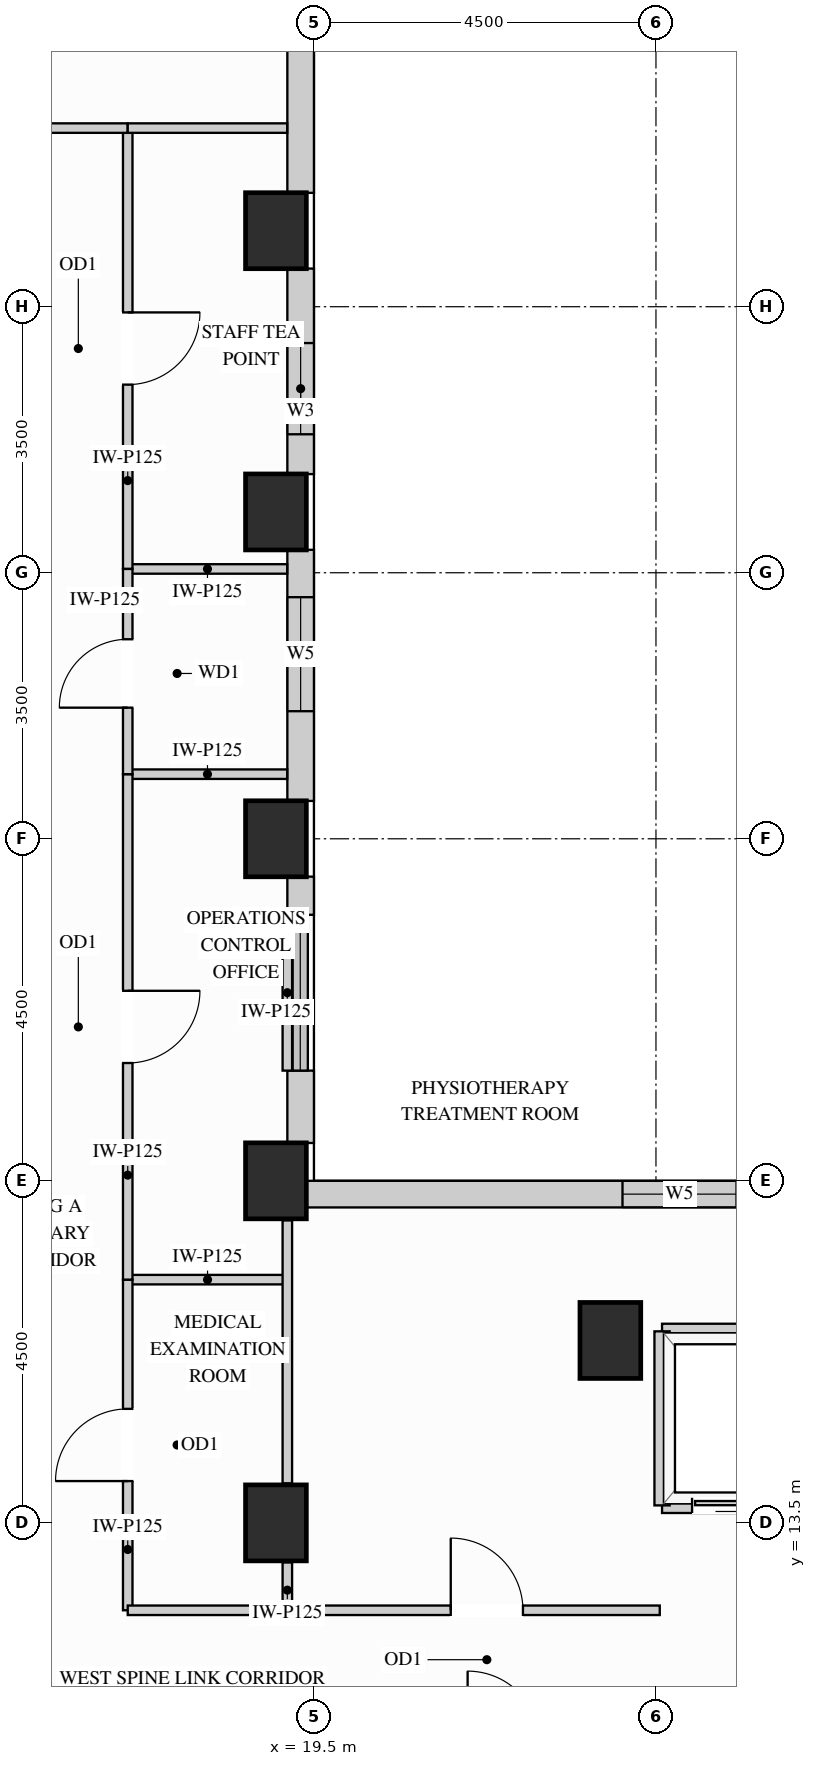
"""IFC4 building model, lengths in metres.
Left out: names, types, materials, properties, quantities, classifications, styles, units other than length and angle.
Written with IfcOpenShell. Run it as: python <this file> out.ifc"""

import sys

from ifc_helpers import new_model, si_unit, direction, frame, frame_2d, origin, origin_2d, place, context, subcontext, project, spatial, rectangle, extrude, source, transform, mapped, element, fill, save


model = new_model("IFC4")
c1 = context("Model", 3, precision=1e-05, world=origin(), true_north=direction((0.0, 1.0)))
c2 = subcontext(c1, "Body", "Model", "MODEL_VIEW")
j1 = project(units=[si_unit("LENGTHUNIT", "METRE"), si_unit("PLANEANGLEUNIT", "RADIAN")], contexts=[c1])
p1 = place(None, origin())
s1 = spatial("IfcSite", under=j1, at=p1, CompositionType="ELEMENT")
p2 = place(p1, origin())
s2 = spatial("IfcBuilding", under=s1, at=p2, CompositionType="ELEMENT")
p3 = place(p2, frame((0.0, 0.0, 182.7)))
s3 = spatial("IfcBuildingStorey", under=s2, at=p3, CompositionType="ELEMENT", Elevation=182.7)
m1 = source(origin(), c2, "Body", "SweptSolid", [
    extrude(rectangle(XDim=0.8, YDim=1.0, at=origin_2d()), origin(), (0.0, 0.0, 1.0), 3.4),
])
for number, where, z_axis, x_axis in (
    (1, (19.0, 13.5, 0.0), (0.0, 0.0, 1.0), (1.0, 0.0, 0.0)),
    (2, (19.0, 18.0, 0.0), (0.0, 0.0, 1.0), (1.0, 0.0, 0.0)),
    (3, (19.0, 22.5, 0.0), (0.0, 0.0, 1.0), (1.0, 0.0, 0.0)),
    (4, (19.0, 26.8, 0.0), (0.0, 0.0, 1.0), (1.0, 0.0, 0.0)),
    (5, (19.0, 30.5, 0.0), (0.0, 0.0, 1.0), (1.0, 0.0, 0.0)),
    (6, (23.4, 15.9, 0.0), (0.0, 0.0, 1.0), (1.0, 0.0, 0.0)),
):
    element("IfcColumn", number, at=place(p3, frame(where, z_axis=z_axis, x_axis=x_axis)), inside=s3, PredefinedType="COLUMN", context=c2, shape_type="MappedRepresentation", body=[
        mapped(m1, transform((0.0, 0.0, 0.0), x_axis=(1.0, 0.0, 0.0), y_axis=(0.0, 1.0, 0.0), z_axis=(0.0, 0.0, 1.0))),
    ])
p4 = place(p3, frame((34.502, 17.825, 0.0), z_axis=(0.0, 0.0, 1.0), x_axis=(-1.0, 0.0, 0.0)))
e7 = element("IfcWall", 7, at=p4, inside=s3, PredefinedType="SOLIDWALL", context=c2, shape_type="SweptSolid", body=[
    extrude(rectangle(XDim=15.104, YDim=0.35, at=frame_2d((7.552, 0.0))), origin(), (0.0, 0.0, 1.0), 3.385),
])
p5 = place(p4, frame((4.131, 0.0, 0.78)))
e8 = element("IfcOpeningElement", 8, at=p5, cuts=e7, PredefinedType="OPENING", context=c2, shape_type="SweptSolid", body=[
    extrude(rectangle(XDim=1.5, YDim=2.0, at=frame_2d((0.75, 1.0))), frame((0.0, 0.185, 0.0), z_axis=(0.0, -1.0, 0.0), x_axis=(1.0, 0.0, 0.0)), (0.0, 0.0, 1.0), 0.37),
])
p6 = place(p4, frame((9.442, 0.0, 0.78)))
e9 = element("IfcOpeningElement", 9, at=p6, cuts=e7, PredefinedType="OPENING", context=c2, shape_type="SweptSolid", body=[
    extrude(rectangle(XDim=1.5, YDim=2.0, at=frame_2d((0.75, 1.0))), frame((0.0, 0.185, 0.0), z_axis=(0.0, -1.0, 0.0), x_axis=(1.0, 0.0, 0.0)), (0.0, 0.0, 1.0), 0.37),
])
m2 = source(origin(), c2, "Body", "SweptSolid", [
    extrude(rectangle(XDim=0.952, YDim=0.35, at=frame_2d((0.476, 0.0))), origin(), (0.0, 0.0, 1.0), 2.612),
])
p7 = place(p3, frame((19.325, 18.498, 0.0), z_axis=(0.0, 0.0, 1.0), x_axis=(0.0, 1.0, 0.0)))
e10 = element("IfcWall", 10, at=p7, inside=s3, PredefinedType="SOLIDWALL", context=c2, shape_type="MappedRepresentation", body=[
    mapped(m2, transform((0.0, 0.0, 0.0), x_axis=(1.0, 0.0, 0.0), y_axis=(0.0, 1.0, 0.0), z_axis=(0.0, 0.0, 1.0))),
])
m3 = source(origin(), c2, "Body", "SweptSolid", [
    extrude(rectangle(XDim=0.502, YDim=0.35, at=frame_2d((0.251, 0.0))), origin(), (0.0, 0.0, 1.0), 2.612),
])
p8 = place(p3, frame((19.325, 21.5, 0.0), z_axis=(0.0, 0.0, 1.0), x_axis=(0.0, 1.0, 0.0)))
e11 = element("IfcWall", 11, at=p8, inside=s3, PredefinedType="SOLIDWALL", context=c2, shape_type="MappedRepresentation", body=[
    mapped(m3, transform((0.0, 0.0, 0.0), x_axis=(1.0, 0.0, 0.0), y_axis=(0.0, 1.0, 0.0), z_axis=(0.0, 0.0, 1.0))),
])
p9 = place(p3, frame((19.325, 22.998, 0.0), z_axis=(0.0, 0.0, 1.0), x_axis=(0.0, 1.0, 0.0)))
e12 = element("IfcWall", 12, at=p9, inside=s3, PredefinedType="SOLIDWALL", context=c2, shape_type="SweptSolid", body=[
    extrude(rectangle(XDim=3.304, YDim=0.35, at=frame_2d((1.652, 0.0))), origin(), (0.0, 0.0, 1.0), 2.612),
])
p10 = place(p9, frame((1.18, 0.0, 0.78)))
e13 = element("IfcOpeningElement", 13, at=p10, cuts=e12, PredefinedType="OPENING", context=c2, shape_type="SweptSolid", body=[
    extrude(rectangle(XDim=1.5, YDim=1.652, at=frame_2d((0.75, 0.826))), frame((0.0, 0.185, 0.0), z_axis=(0.0, -1.0, 0.0), x_axis=(1.0, 0.0, 0.0)), (0.0, 0.0, 1.0), 0.37),
])
p11 = place(p3, frame((19.325, 27.298, 0.0), z_axis=(0.0, 0.0, 1.0), x_axis=(0.0, 1.0, 0.0)))
e14 = element("IfcWall", 14, at=p11, inside=s3, PredefinedType="SOLIDWALL", context=c2, shape_type="SweptSolid", body=[
    extrude(rectangle(XDim=2.704, YDim=0.35, at=frame_2d((1.352, 0.0))), origin(), (0.0, 0.0, 1.0), 2.612),
])
p12 = place(p11, frame((0.524, 0.0, 0.78)))
e15 = element("IfcOpeningElement", 15, at=p12, cuts=e14, PredefinedType="OPENING", context=c2, shape_type="SweptSolid", body=[
    extrude(rectangle(XDim=1.2, YDim=1.652, at=frame_2d((0.6, 0.826))), frame((0.0, 0.185, 0.0), z_axis=(0.0, -1.0, 0.0), x_axis=(1.0, 0.0, 0.0)), (0.0, 0.0, 1.0), 0.37),
])
m4 = source(origin(), c2, "Body", "SweptSolid", [
    extrude(rectangle(XDim=3.504, YDim=0.35, at=frame_2d((1.752, 0.0))), origin(), (0.0, 0.0, 1.0), 2.612),
])
p13 = place(p3, frame((19.325, 30.998, 0.0), z_axis=(0.0, 0.0, 1.0), x_axis=(0.0, 1.0, 0.0)))
e16 = element("IfcWall", 16, at=p13, inside=s3, PredefinedType="SOLIDWALL", context=c2, shape_type="MappedRepresentation", body=[
    mapped(m4, transform((0.0, 0.0, 0.0), x_axis=(1.0, 0.0, 0.0), y_axis=(0.0, 1.0, 0.0), z_axis=(0.0, 0.0, 1.0))),
])
m5 = source(origin(), c2, "Body", "SweptSolid", [
    extrude(rectangle(XDim=2.1, YDim=0.125, at=frame_2d((1.05, 0.0))), origin(), (0.0, 0.0, 1.0), 2.916),
])
p14 = place(p3, frame((17.05, 16.7, 0.0), z_axis=(0.0, 0.0, 1.0), x_axis=(1.0, 0.0, 0.0)))
e17 = element("IfcWall", 17, at=p14, inside=s3, PredefinedType="PARTITIONING", context=c2, shape_type="MappedRepresentation", body=[
    mapped(m5, transform((0.0, 0.0, 0.0), x_axis=(1.0, 0.0, 0.0), y_axis=(0.0, 1.0, 0.0), z_axis=(0.0, 0.0, 1.0))),
])
m6 = source(origin(), c2, "Body", "SweptSolid", [
    extrude(rectangle(XDim=2.098, YDim=0.125, at=frame_2d((1.049, 0.0))), origin(), (0.0, 0.0, 1.0), 3.385),
])
for number, where, z_axis, x_axis in (
    (18, (17.05, 23.35, 0.0), (0.0, 0.0, 1.0), (1.0, 0.0, 0.0)),
    (19, (17.05, 26.05, 0.0), (0.0, 0.0, 1.0), (1.0, 0.0, 0.0)),
):
    element("IfcWall", number, at=place(p3, frame(where, z_axis=z_axis, x_axis=x_axis)), inside=s3, PredefinedType="PARTITIONING", context=c2, shape_type="MappedRepresentation", body=[
        mapped(m6, transform((0.0, 0.0, 0.0), x_axis=(1.0, 0.0, 0.0), y_axis=(0.0, 1.0, 0.0), z_axis=(0.0, 0.0, 1.0))),
    ])
m7 = source(origin(), c2, "Body", "SweptSolid", [
    extrude(rectangle(XDim=0.63, YDim=0.125, at=frame_2d((0.315, 0.0))), origin(), (0.0, 0.0, 1.0), 2.773),
])
p15 = place(p3, frame((19.15, 12.35, 0.0), z_axis=(0.0, 0.0, 1.0), x_axis=(0.0, 1.0, 0.0)))
e20 = element("IfcWall", 20, at=p15, inside=s3, PredefinedType="PARTITIONING", context=c2, shape_type="MappedRepresentation", body=[
    mapped(m7, transform((0.0, 0.0, 0.0), x_axis=(1.0, 0.0, 0.0), y_axis=(0.0, 1.0, 0.0), z_axis=(0.0, 0.0, 1.0))),
])
m8 = source(origin(), c2, "Body", "SweptSolid", [
    extrude(rectangle(XDim=3.46, YDim=0.125, at=frame_2d((1.73, 0.0))), origin(), (0.0, 0.0, 1.0), 2.773),
])
p16 = place(p3, frame((19.15, 14.02, 0.0), z_axis=(0.0, 0.0, 1.0), x_axis=(0.0, 1.0, 0.0)))
e21 = element("IfcWall", 21, at=p16, inside=s3, PredefinedType="PARTITIONING", context=c2, shape_type="MappedRepresentation", body=[
    mapped(m8, transform((0.0, 0.0, 0.0), x_axis=(1.0, 0.0, 0.0), y_axis=(0.0, 1.0, 0.0), z_axis=(0.0, 0.0, 1.0))),
])
m9 = source(origin(), c2, "Body", "SweptSolid", [
    extrude(rectangle(XDim=2.05, YDim=0.125, at=frame_2d((1.025, 0.0))), origin(), (0.0, 0.0, 1.0), 2.612),
])
p17 = place(p3, frame((19.15, 19.45, 0.0), z_axis=(0.0, 0.0, 1.0), x_axis=(0.0, 1.0, 0.0)))
e22 = element("IfcWall", 22, at=p17, inside=s3, PredefinedType="PARTITIONING", context=c2, shape_type="MappedRepresentation", body=[
    mapped(m9, transform((0.0, 0.0, 0.0), x_axis=(1.0, 0.0, 0.0), y_axis=(0.0, 1.0, 0.0), z_axis=(0.0, 0.0, 1.0))),
])
p18 = place(p3, frame((17.05, 12.35, 0.0), z_axis=(0.0, 0.0, 1.0), x_axis=(0.0, 1.0, 0.0)))
e23 = element("IfcWall", 23, at=p18, inside=s3, PredefinedType="PARTITIONING", context=c2, shape_type="SweptSolid", body=[
    extrude(rectangle(XDim=4.35, YDim=0.125, at=frame_2d((2.175, 0.0))), origin(), (0.0, 0.0, 1.0), 3.385),
])
p19 = place(p18, frame((1.7, 0.0, 0.0)))
e24 = element("IfcOpeningElement", 24, at=p19, cuts=e23, PredefinedType="OPENING", context=c2, shape_type="SweptSolid", body=[
    extrude(rectangle(XDim=0.95, YDim=2.15, at=frame_2d((0.475, 1.075))), frame((0.0, 0.073, 0.0), z_axis=(0.0, -1.0, 0.0), x_axis=(1.0, 0.0, 0.0)), (0.0, 0.0, 1.0), 0.145),
])
p20 = place(p3, frame((17.05, 16.7, 0.0), z_axis=(0.0, 0.0, 1.0), x_axis=(0.0, 1.0, 0.0)))
e25 = element("IfcWall", 25, at=p20, inside=s3, PredefinedType="PARTITIONING", context=c2, shape_type="SweptSolid", body=[
    extrude(rectangle(XDim=6.65, YDim=0.125, at=frame_2d((3.325, 0.0))), origin(), (0.0, 0.0, 1.0), 3.385),
])
p21 = place(p20, frame((2.85, 0.0, 0.0)))
e26 = element("IfcOpeningElement", 26, at=p21, cuts=e25, PredefinedType="OPENING", context=c2, shape_type="SweptSolid", body=[
    extrude(rectangle(XDim=0.95, YDim=2.15, at=frame_2d((0.475, 1.075))), frame((0.0, 0.073, 0.0), z_axis=(0.0, -1.0, 0.0), x_axis=(1.0, 0.0, 0.0)), (0.0, 0.0, 1.0), 0.145),
])
p22 = place(p3, frame((17.05, 26.05, 0.0), z_axis=(0.0, 0.0, 1.0), x_axis=(0.0, 1.0, 0.0)))
e27 = element("IfcWall", 27, at=p22, inside=s3, PredefinedType="PARTITIONING", context=c2, shape_type="SweptSolid", body=[
    extrude(rectangle(XDim=5.8, YDim=0.125, at=frame_2d((2.9, 0.0))), origin(), (0.0, 0.0, 1.0), 3.385),
])
p23 = place(p22, frame((2.425, 0.0, 0.0)))
e28 = element("IfcOpeningElement", 28, at=p23, cuts=e27, PredefinedType="OPENING", context=c2, shape_type="SweptSolid", body=[
    extrude(rectangle(XDim=0.95, YDim=2.15, at=frame_2d((0.475, 1.075))), frame((0.0, 0.073, 0.0), z_axis=(0.0, -1.0, 0.0), x_axis=(1.0, 0.0, 0.0)), (0.0, 0.0, 1.0), 0.145),
])
p24 = place(p3, frame((17.05, 23.35, 0.0), z_axis=(0.0, 0.0, 1.0), x_axis=(0.0, 1.0, 0.0)))
e29 = element("IfcWall", 29, at=p24, inside=s3, PredefinedType="PARTITIONING", context=c2, shape_type="SweptSolid", body=[
    extrude(rectangle(XDim=2.7, YDim=0.125, at=frame_2d((1.35, 0.0))), origin(), (0.0, 0.0, 1.0), 3.385),
])
p25 = place(p24, frame((0.875, 0.0, 0.0)))
e30 = element("IfcOpeningElement", 30, at=p25, cuts=e29, PredefinedType="OPENING", context=c2, shape_type="SweptSolid", body=[
    extrude(rectangle(XDim=0.9, YDim=2.15, at=frame_2d((0.45, 1.075))), frame((0.0, 0.073, 0.0), z_axis=(0.0, -1.0, 0.0), x_axis=(1.0, 0.0, 0.0)), (0.0, 0.0, 1.0), 0.145),
])
p26 = place(p3, frame((9.039, 31.85, 0.0), z_axis=(0.0, 0.0, 1.0), x_axis=(1.0, 0.0, 0.0)))
e31 = element("IfcWall", 31, at=p26, inside=s3, PredefinedType="PARTITIONING", context=c2, shape_type="SweptSolid", body=[
    extrude(rectangle(XDim=8.011, YDim=0.125, at=frame_2d((4.005, 0.0))), origin(), (0.0, 0.0, 1.0), 2.848),
])
p27 = place(p26, frame((3.531, 0.0, 0.0)))
e32 = element("IfcOpeningElement", 32, at=p27, cuts=e31, PredefinedType="OPENING", context=c2, shape_type="SweptSolid", body=[
    extrude(rectangle(XDim=0.95, YDim=2.15, at=frame_2d((0.475, 1.075))), frame((0.0, 0.073, 0.0), z_axis=(0.0, -1.0, 0.0), x_axis=(1.0, 0.0, 0.0)), (0.0, 0.0, 1.0), 0.145),
])
m10 = source(origin(), c2, "Body", "SweptSolid", [
    extrude(rectangle(XDim=2.098, YDim=0.125, at=frame_2d((1.049, 0.0))), origin(), (0.0, 0.0, 1.0), 2.848),
])
p28 = place(p3, frame((17.05, 31.85, 0.0), z_axis=(0.0, 0.0, 1.0), x_axis=(1.0, 0.0, 0.0)))
e33 = element("IfcWall", 33, at=p28, inside=s3, PredefinedType="PARTITIONING", context=c2, shape_type="MappedRepresentation", body=[
    mapped(m10, transform((0.0, 0.0, 0.0), x_axis=(1.0, 0.0, 0.0), y_axis=(0.0, 1.0, 0.0), z_axis=(0.0, 0.0, 1.0))),
])
m11 = source(origin(), c2, "Body", "SweptSolid", [
    extrude(rectangle(XDim=2.45, YDim=0.125, at=frame_2d((1.225, 0.0))), origin(), (0.0, 0.0, 1.0), 3.385),
])
p29 = place(p3, frame((17.05, 12.35, 0.0), z_axis=(0.0, 0.0, 1.0), x_axis=(1.0, 0.0, 0.0)))
e34 = element("IfcWall", 34, at=p29, inside=s3, PredefinedType="PARTITIONING", context=c2, shape_type="MappedRepresentation", body=[
    mapped(m11, transform((0.0, 0.0, 0.0), x_axis=(1.0, 0.0, 0.0), y_axis=(0.0, 1.0, 0.0), z_axis=(0.0, 0.0, 1.0))),
])
p30 = place(p3, frame((19.5, 12.35, 0.0), z_axis=(0.0, 0.0, 1.0), x_axis=(1.0, 0.0, 0.0)))
e35 = element("IfcWall", 35, at=p30, inside=s3, PredefinedType="PARTITIONING", context=c2, shape_type="SweptSolid", body=[
    extrude(rectangle(XDim=4.55, YDim=0.125, at=frame_2d((2.275, 0.0))), origin(), (0.0, 0.0, 1.0), 3.385),
])
p31 = place(p30, frame((1.8, 0.0, 0.0)))
e36 = element("IfcOpeningElement", 36, at=p31, cuts=e35, PredefinedType="OPENING", context=c2, shape_type="SweptSolid", body=[
    extrude(rectangle(XDim=0.95, YDim=2.15, at=frame_2d((0.475, 1.075))), frame((0.0, 0.073, 0.0), z_axis=(0.0, -1.0, 0.0), x_axis=(1.0, 0.0, 0.0)), (0.0, 0.0, 1.0), 0.145),
])
m12 = source(origin(), c2, "Body", "SweptSolid", [
    extrude(rectangle(XDim=1.89, YDim=0.2, at=frame_2d((0.945, 0.0))), origin(), (0.0, 0.0, 1.0), 2.773),
])
p32 = place(p3, frame((24.08, 16.02, 0.0), z_axis=(0.0, 0.0, 1.0), x_axis=(1.0, 0.0, 0.0)))
e37 = element("IfcWall", 37, at=p32, inside=s3, PredefinedType="PARTITIONING", context=c2, shape_type="MappedRepresentation", body=[
    mapped(m12, transform((0.0, 0.0, 0.0), x_axis=(1.0, 0.0, 0.0), y_axis=(0.0, 1.0, 0.0), z_axis=(0.0, 0.0, 1.0))),
])
p33 = place(p3, frame((24.08, 13.73, 0.0), z_axis=(0.0, 0.0, 1.0), x_axis=(1.0, 0.0, 0.0)))
e38 = element("IfcWall", 38, at=p33, inside=s3, PredefinedType="PARTITIONING", context=c2, shape_type="SweptSolid", body=[
    extrude(rectangle(XDim=1.89, YDim=0.2, at=frame_2d((0.945, 0.0))), origin(), (0.0, 0.0, 1.0), 2.466),
])
p34 = place(p33, frame((0.395, 0.0, 0.0)))
e39 = element("IfcOpeningElement", 39, at=p34, cuts=e38, PredefinedType="OPENING", context=c2, shape_type="SweptSolid", body=[
    extrude(rectangle(XDim=1.1, YDim=2.2, at=frame_2d((0.55, 1.1))), frame((0.0, 0.11, 0.0), z_axis=(0.0, -1.0, 0.0), x_axis=(1.0, 0.0, 0.0)), (0.0, 0.0, 1.0), 0.22),
])
m13 = source(origin(), c2, "Body", "SweptSolid", [
    extrude(rectangle(XDim=2.29, YDim=0.2, at=frame_2d((1.145, 0.0))), origin(), (0.0, 0.0, 1.0), 3.385),
])
p35 = place(p3, frame((24.08, 13.73, 0.0), z_axis=(0.0, 0.0, 1.0), x_axis=(0.0, 1.0, 0.0)))
e40 = element("IfcWall", 40, at=p35, inside=s3, PredefinedType="PARTITIONING", context=c2, shape_type="MappedRepresentation", body=[
    mapped(m13, transform((0.0, 0.0, 0.0), x_axis=(1.0, 0.0, 0.0), y_axis=(0.0, 1.0, 0.0), z_axis=(0.0, 0.0, 1.0))),
])
m14 = source(origin(), c2, "Body", "SweptSolid", [
    extrude(rectangle(XDim=1.1, YDim=2.2, at=frame_2d((0.55, 1.1))), frame((0.0, 0.025, 0.0), z_axis=(0.0, -1.0, 0.0), x_axis=(1.0, 0.0, 0.0)), (0.0, 0.0, 1.0), 0.05),
])
p36 = place(p34, origin())
e41 = element("IfcDoor", 41, at=p36, inside=s3, OperationType="SLIDING_TO_LEFT", PredefinedType="DOOR", context=c2, shape_type="MappedRepresentation", body=[
    mapped(m14, transform((0.0, 0.0, 0.0), x_axis=(1.0, 0.0, 0.0), y_axis=(0.0, 1.0, 0.0), z_axis=(0.0, 0.0, 1.0))),
])
fill(e39, e41)
m15 = source(origin(), c2, "Body", "SweptSolid", [
    extrude(rectangle(XDim=0.95, YDim=2.15, at=frame_2d((0.475, 1.075))), frame((0.0, 0.025, 0.0), z_axis=(0.0, -1.0, 0.0), x_axis=(1.0, 0.0, 0.0)), (0.0, 0.0, 1.0), 0.05),
])
p37 = place(p19, origin())
e42 = element("IfcDoor", 42, at=p37, inside=s3, OperationType="SINGLE_SWING_LEFT", PredefinedType="DOOR", context=c2, shape_type="MappedRepresentation", body=[
    mapped(m15, transform((0.0, 0.0, 0.0), x_axis=(1.0, 0.0, 0.0), y_axis=(0.0, 1.0, 0.0), z_axis=(0.0, 0.0, 1.0))),
])
fill(e24, e42)
p38 = place(p21, origin())
e43 = element("IfcDoor", 43, at=p38, inside=s3, OperationType="SINGLE_SWING_RIGHT", PredefinedType="DOOR", context=c2, shape_type="MappedRepresentation", body=[
    mapped(m15, transform((0.0, 0.0, 0.0), x_axis=(1.0, 0.0, 0.0), y_axis=(0.0, 1.0, 0.0), z_axis=(0.0, 0.0, 1.0))),
])
fill(e26, e43)
p39 = place(p23, origin())
e44 = element("IfcDoor", 44, at=p39, inside=s3, OperationType="SINGLE_SWING_RIGHT", PredefinedType="DOOR", context=c2, shape_type="MappedRepresentation", body=[
    mapped(m15, transform((0.0, 0.0, 0.0), x_axis=(1.0, 0.0, 0.0), y_axis=(0.0, 1.0, 0.0), z_axis=(0.0, 0.0, 1.0))),
])
fill(e28, e44)
p40 = place(p31, origin())
e45 = element("IfcDoor", 45, at=p40, inside=s3, OperationType="SINGLE_SWING_LEFT", PredefinedType="DOOR", context=c2, shape_type="MappedRepresentation", body=[
    mapped(m15, transform((0.0, 0.0, 0.0), x_axis=(1.0, 0.0, 0.0), y_axis=(0.0, 1.0, 0.0), z_axis=(0.0, 0.0, 1.0))),
])
fill(e36, e45)
m16 = source(origin(), c2, "Body", "SweptSolid", [
    extrude(rectangle(XDim=0.9, YDim=2.15, at=frame_2d((0.45, 1.075))), frame((0.0, 0.025, 0.0), z_axis=(0.0, -1.0, 0.0), x_axis=(1.0, 0.0, 0.0)), (0.0, 0.0, 1.0), 0.05),
])
p41 = place(p25, origin())
e46 = element("IfcDoor", 46, at=p41, inside=s3, OperationType="SINGLE_SWING_LEFT", PredefinedType="DOOR", context=c2, shape_type="MappedRepresentation", body=[
    mapped(m16, transform((0.0, 0.0, 0.0), x_axis=(1.0, 0.0, 0.0), y_axis=(0.0, 1.0, 0.0), z_axis=(0.0, 0.0, 1.0))),
])
fill(e30, e46)
m17 = source(origin(), c2, "Body", "SweptSolid", [
    extrude(rectangle(XDim=1.2, YDim=1.652, at=frame_2d((0.6, 0.826))), frame((0.0, 0.03, 0.0), z_axis=(0.0, -1.0, 0.0), x_axis=(1.0, 0.0, 0.0)), (0.0, 0.0, 1.0), 0.06),
])
p42 = place(p12, origin())
e47 = element("IfcWindow", 47, at=p42, inside=s3, PartitioningType="SINGLE_PANEL", PredefinedType="WINDOW", context=c2, shape_type="MappedRepresentation", body=[
    mapped(m17, transform((0.0, 0.0, 0.0), x_axis=(1.0, 0.0, 0.0), y_axis=(0.0, 1.0, 0.0), z_axis=(0.0, 0.0, 1.0))),
])
fill(e15, e47)
m18 = source(origin(), c2, "Body", "SweptSolid", [
    extrude(rectangle(XDim=1.5, YDim=2.0, at=frame_2d((0.75, 1.0))), frame((0.0, 0.03, 0.0), z_axis=(0.0, -1.0, 0.0), x_axis=(1.0, 0.0, 0.0)), (0.0, 0.0, 1.0), 0.06),
])
p43 = place(p6, origin())
e48 = element("IfcWindow", 48, at=p43, inside=s3, PartitioningType="SINGLE_PANEL", PredefinedType="WINDOW", context=c2, shape_type="MappedRepresentation", body=[
    mapped(m18, transform((0.0, 0.0, 0.0), x_axis=(1.0, 0.0, 0.0), y_axis=(0.0, 1.0, 0.0), z_axis=(0.0, 0.0, 1.0))),
])
fill(e9, e48)
m19 = source(origin(), c2, "Body", "SweptSolid", [
    extrude(rectangle(XDim=1.5, YDim=1.652, at=frame_2d((0.75, 0.826))), frame((0.0, 0.03, 0.0), z_axis=(0.0, -1.0, 0.0), x_axis=(1.0, 0.0, 0.0)), (0.0, 0.0, 1.0), 0.06),
])
p44 = place(p10, origin())
e49 = element("IfcWindow", 49, at=p44, inside=s3, PartitioningType="SINGLE_PANEL", PredefinedType="WINDOW", context=c2, shape_type="MappedRepresentation", body=[
    mapped(m19, transform((0.0, 0.0, 0.0), x_axis=(1.0, 0.0, 0.0), y_axis=(0.0, 1.0, 0.0), z_axis=(0.0, 0.0, 1.0))),
])
fill(e13, e49)
save(model, sys.argv[1])
